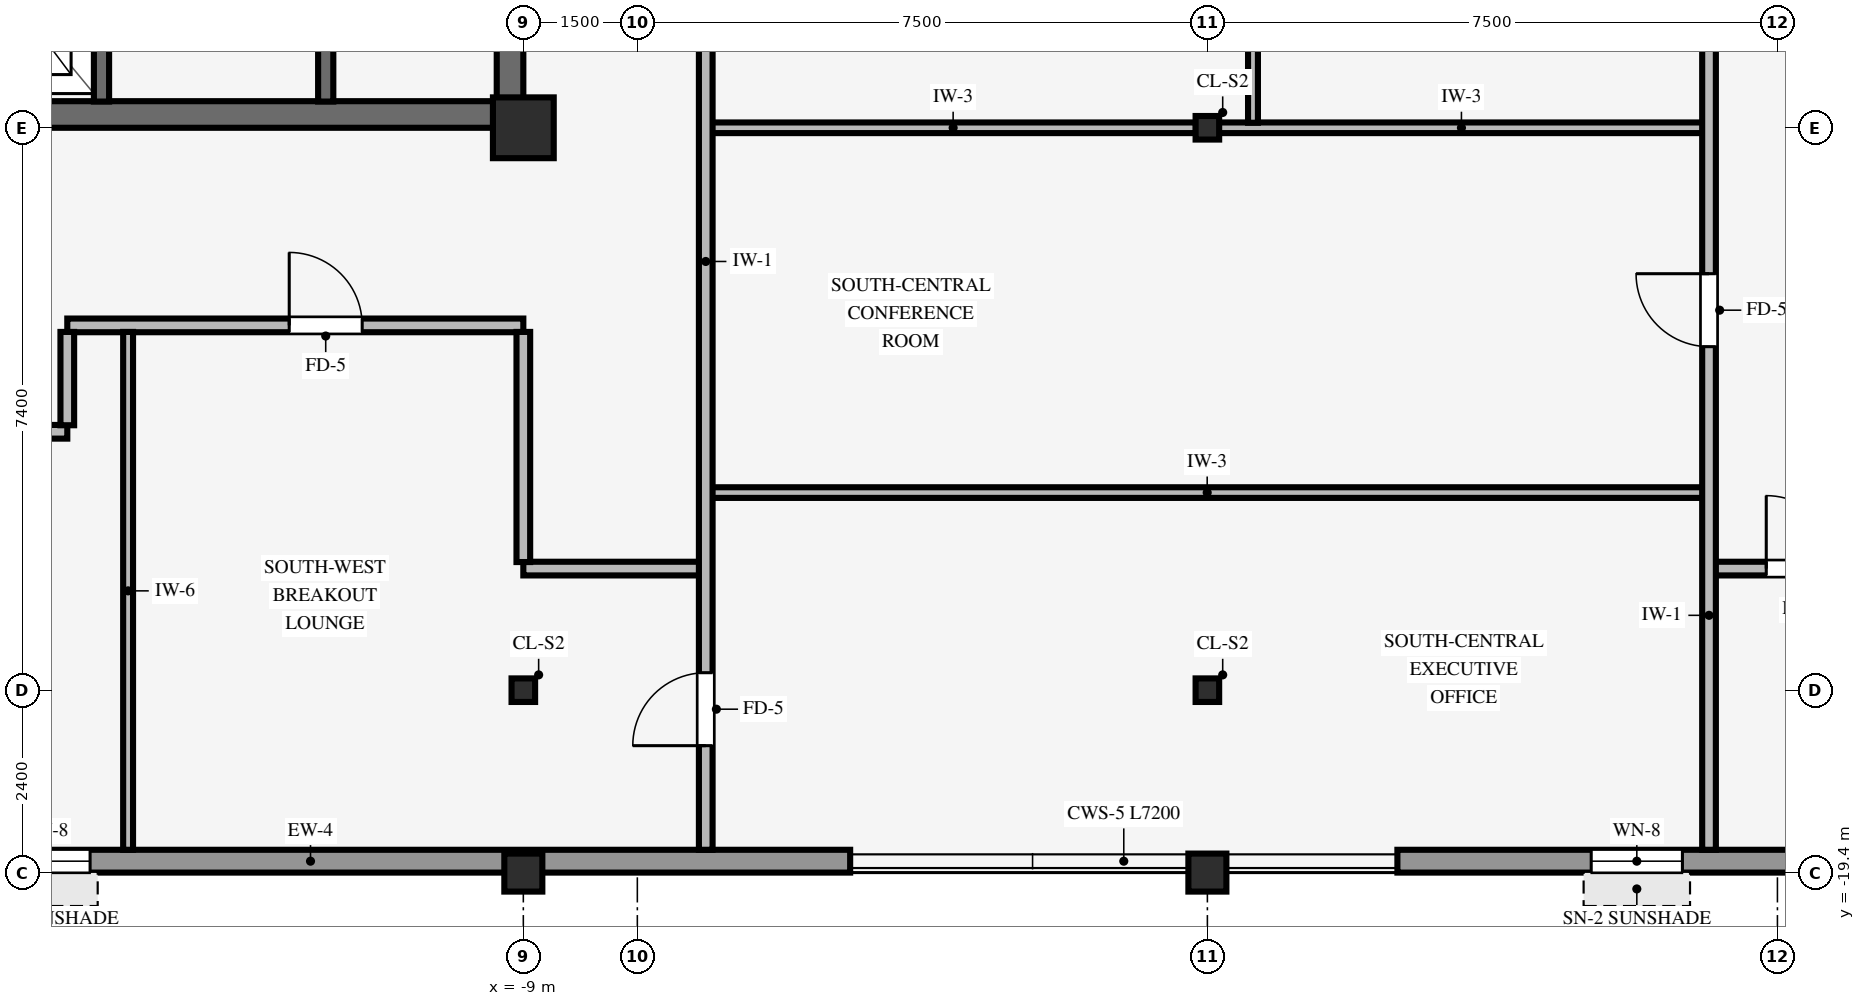
"""IFC4 building model, lengths in metres.
Left out: names, types, materials, properties, quantities, classifications, styles, units other than length and angle.
Written with IfcOpenShell. Run it as: python <this file> out.ifc"""

import sys

from ifc_helpers import new_model, si_unit, direction, frame, frame_2d, origin, origin_2d, place, context, subcontext, project, spatial, rectangle, hollow_rectangle, i_section, extrude, source, transform, mapped, element, fill, save


model = new_model("IFC4")
c1 = context("Model", 3, precision=1e-05, world=origin(), true_north=direction((0.0, 1.0)))
c2 = subcontext(c1, "Body", "Model", "MODEL_VIEW")
j1 = project(units=[si_unit("LENGTHUNIT", "METRE"), si_unit("PLANEANGLEUNIT", "RADIAN")], contexts=[c1])
p1 = place(None, origin())
s1 = spatial("IfcSite", under=j1, at=p1, CompositionType="ELEMENT")
p2 = place(p1, origin())
s2 = spatial("IfcBuilding", under=s1, at=p2, CompositionType="ELEMENT")
p3 = place(p2, frame((0.0, 0.0, 249.3)))
s3 = spatial("IfcBuildingStorey", under=s2, at=p3, CompositionType="ELEMENT", Elevation=249.3)
p4 = place(p3, frame((-17.5, -9.425, 0.0), z_axis=(0.0, 0.0, 1.0), x_axis=(1.0, 0.0, 0.0)))
e1 = element("IfcWall", 1, at=p4, inside=s3, PredefinedType="SHEAR", context=c2, shape_type="SweptSolid", body=[
    extrude(rectangle(XDim=8.5, YDim=0.35, at=frame_2d((4.25, 0.0))), origin(), (0.0, 0.0, 1.0), 3.25),
])
p5 = place(p3, frame((-9.175, -9.255, 0.0), z_axis=(0.0, 0.0, 1.0), x_axis=(0.0, 1.0, 0.0)))
e2 = element("IfcWall", 2, at=p5, inside=s3, PredefinedType="SHEAR", context=c2, shape_type="SweptSolid", body=[
    extrude(rectangle(XDim=18.51, YDim=0.35, at=frame_2d((9.255, 0.0))), origin(), (0.0, 0.0, 1.0), 3.25),
])
p6 = place(p5, frame((8.655, 0.0, 0.0)))
e3 = element("IfcOpeningElement", 3, at=p6, cuts=e2, PredefinedType="OPENING", context=c2, shape_type="SweptSolid", body=[
    extrude(rectangle(XDim=1.2, YDim=2.15, at=frame_2d((0.6, 1.075))), frame((0.0, 0.185, 0.0), z_axis=(0.0, -1.0, 0.0), x_axis=(1.0, 0.0, 0.0)), (0.0, 0.0, 1.0), 0.37),
])
p7 = place(p3, frame((-9.0, -9.6, 0.0), z_axis=(0.0, 0.0, 1.0), x_axis=(1.0, 0.0, 0.0)))
e4 = element("IfcColumn", 4, at=p7, inside=s3, PredefinedType="COLUMN", context=c2, shape_type="SweptSolid", body=[
    extrude(rectangle(XDim=0.8, YDim=0.8, at=origin_2d()), origin(), (0.0, 0.0, 1.0), 3.25),
])
for number, where, z_axis, x_axis in (
    (5, (-9.0, -19.4, 0.0), (0.0, 0.0, 1.0), (1.0, 0.0, 0.0)),
    (6, (0.0, -19.4, 0.0), (0.0, 0.0, 1.0), (1.0, 0.0, 0.0)),
):
    element("IfcColumn", number, at=place(p3, frame(where, z_axis=z_axis, x_axis=x_axis)), inside=s3, PredefinedType="COLUMN", context=c2, shape_type="SweptSolid", body=[
        extrude(hollow_rectangle(XDim=0.5, YDim=0.5, WallThickness=0.032, InnerFilletRadius=0.032, OuterFilletRadius=0.064, at=origin_2d()), origin(), (0.0, 0.0, 1.0), 3.25),
    ])
for number, where, z_axis, x_axis in (
    (7, (0.0, -17.0, 0.0), (0.0, 0.0, 1.0), (1.0, 0.0, 0.0)),
    (8, (0.0, -9.6, 0.0), (0.0, 0.0, 1.0), (1.0, 0.0, 0.0)),
    (9, (-9.0, -17.0, 0.0), (0.0, 0.0, 1.0), (1.0, 0.0, 0.0)),
):
    element("IfcColumn", number, at=place(p3, frame(where, z_axis=z_axis, x_axis=x_axis)), inside=s3, PredefinedType="COLUMN", context=c2, shape_type="SweptSolid", body=[
        extrude(i_section(OverallWidth=0.31, OverallDepth=0.31, WebThickness=0.015, FlangeThickness=0.015, FilletRadius=0.015, at=origin_2d()), origin(), (0.0, 0.0, 1.0), 3.25),
    ])
p8 = place(p3, frame((-18.9, -19.25, 0.0), z_axis=(0.0, 0.0, 1.0), x_axis=(1.0, 0.0, 0.0)))
e10 = element("IfcWall", 10, at=p8, inside=s3, PredefinedType="STANDARD", context=c2, shape_type="SweptSolid", body=[
    extrude(rectangle(XDim=14.2, YDim=0.3, at=frame_2d((7.1, 0.0))), origin(), (0.0, 0.0, 1.0), 2.585),
])
p9 = place(p8, frame((3.0, 0.0, 0.8)))
e11 = element("IfcOpeningElement", 11, at=p9, cuts=e10, PredefinedType="OPENING", context=c2, shape_type="SweptSolid", body=[
    extrude(rectangle(XDim=1.2, YDim=1.48, at=frame_2d((0.6, 0.74))), frame((0.0, 0.16, 0.0), z_axis=(0.0, -1.0, 0.0), x_axis=(1.0, 0.0, 0.0)), (0.0, 0.0, 1.0), 0.32),
])
p10 = place(p3, frame((2.5, -19.25, 0.0), z_axis=(0.0, 0.0, 1.0), x_axis=(1.0, 0.0, 0.0)))
e12 = element("IfcWall", 12, at=p10, inside=s3, PredefinedType="STANDARD", context=c2, shape_type="SweptSolid", body=[
    extrude(rectangle(XDim=14.2, YDim=0.3, at=frame_2d((7.1, 0.0))), origin(), (0.0, 0.0, 1.0), 2.585),
])
p11 = place(p10, frame((2.55, 0.0, 0.8)))
e13 = element("IfcOpeningElement", 13, at=p11, cuts=e12, PredefinedType="OPENING", context=c2, shape_type="SweptSolid", body=[
    extrude(rectangle(XDim=1.2, YDim=1.48, at=frame_2d((0.6, 0.74))), frame((0.0, 0.16, 0.0), z_axis=(0.0, -1.0, 0.0), x_axis=(1.0, 0.0, 0.0)), (0.0, 0.0, 1.0), 0.32),
])
p12 = place(p10, frame((9.55, 0.0, 0.8)))
e14 = element("IfcOpeningElement", 14, at=p12, cuts=e12, PredefinedType="OPENING", context=c2, shape_type="SweptSolid", body=[
    extrude(rectangle(XDim=1.2, YDim=1.48, at=frame_2d((0.6, 0.74))), frame((0.0, 0.16, 0.0), z_axis=(0.0, -1.0, 0.0), x_axis=(1.0, 0.0, 0.0)), (0.0, 0.0, 1.0), 0.32),
])
p13 = place(p3, frame((-14.55, -9.255, 0.0), z_axis=(0.0, 0.0, 1.0), x_axis=(0.0, 1.0, 0.0)))
e15 = element("IfcWall", 15, at=p13, inside=s3, PredefinedType="SHEAR", context=c2, shape_type="SweptSolid", body=[
    extrude(rectangle(XDim=3.06, YDim=0.2, at=frame_2d((1.53, 0.0))), origin(), (0.0, 0.0, 1.0), 3.25),
])
p14 = place(p13, frame((0.98, 0.0, 0.0)))
e16 = element("IfcOpeningElement", 16, at=p14, cuts=e15, PredefinedType="OPENING", context=c2, shape_type="SweptSolid", body=[
    extrude(rectangle(XDim=1.15, YDim=2.15, at=frame_2d((0.575, 1.075))), frame((0.0, 0.11, 0.0), z_axis=(0.0, -1.0, 0.0), x_axis=(1.0, 0.0, 0.0)), (0.0, 0.0, 1.0), 0.22),
])
p15 = place(p3, frame((-11.6, -9.255, 0.0), z_axis=(0.0, 0.0, 1.0), x_axis=(0.0, 1.0, 0.0)))
e17 = element("IfcWall", 17, at=p15, inside=s3, PredefinedType="SHEAR", context=c2, shape_type="SweptSolid", body=[
    extrude(rectangle(XDim=8.025, YDim=0.2, at=frame_2d((4.012, 0.0))), origin(), (0.0, 0.0, 1.0), 3.25),
])
p16 = place(p15, frame((5.615, 0.0, 0.0)))
e18 = element("IfcOpeningElement", 18, at=p16, cuts=e17, PredefinedType="OPENING", context=c2, shape_type="SweptSolid", body=[
    extrude(rectangle(XDim=0.88, YDim=2.1, at=frame_2d((0.44, 1.05))), frame((0.0, 0.11, 0.0), z_axis=(0.0, -1.0, 0.0), x_axis=(1.0, 0.0, 0.0)), (0.0, 0.0, 1.0), 0.22),
])
p17 = place(p3, frame((-9.0, -15.4, 0.0), z_axis=(0.0, 0.0, 1.0), x_axis=(1.0, 0.0, 0.0)))
e19 = element("IfcWall", 19, at=p17, inside=s3, PredefinedType="PARTITIONING", context=c2, shape_type="SweptSolid", body=[
    extrude(rectangle(XDim=2.339, YDim=0.18, at=frame_2d((1.169, 0.0))), origin(), (0.0, 0.0, 1.0), 3.24),
])
p18 = place(p3, frame((6.666, -15.4, 0.0), z_axis=(0.0, 0.0, 1.0), x_axis=(1.0, 0.0, 0.0)))
e20 = element("IfcWall", 20, at=p18, inside=s3, PredefinedType="PARTITIONING", context=c2, shape_type="SweptSolid", body=[
    extrude(rectangle(XDim=11.834, YDim=0.18, at=frame_2d((5.917, 0.0))), origin(), (0.0, 0.0, 1.0), 3.24),
])
p19 = place(p18, frame((0.687, 0.0, 0.0)))
e21 = element("IfcOpeningElement", 21, at=p19, cuts=e20, PredefinedType="OPENING", context=c2, shape_type="SweptSolid", body=[
    extrude(rectangle(XDim=0.96, YDim=2.1, at=frame_2d((0.48, 1.05))), frame((0.0, 0.1, 0.0), z_axis=(0.0, -1.0, 0.0), x_axis=(1.0, 0.0, 0.0)), (0.0, 0.0, 1.0), 0.2),
])
p20 = place(p3, frame((-6.539, -14.4, 0.0), z_axis=(0.0, 0.0, 1.0), x_axis=(1.0, 0.0, 0.0)))
e22 = element("IfcWall", 22, at=p20, inside=s3, PredefinedType="PARTITIONING", context=c2, shape_type="SweptSolid", body=[
    extrude(rectangle(XDim=13.073, YDim=0.14, at=frame_2d((6.537, 0.0))), origin(), (0.0, 0.0, 1.0), 3.24),
])
p21 = place(p3, frame((-20.0, -13.6, 0.0), z_axis=(0.0, 0.0, 1.0), x_axis=(1.0, 0.0, 0.0)))
e23 = element("IfcWall", 23, at=p21, inside=s3, PredefinedType="PARTITIONING", context=c2, shape_type="SweptSolid", body=[
    extrude(rectangle(XDim=5.0, YDim=0.18, at=frame_2d((2.5, 0.0))), origin(), (0.0, 0.0, 1.0), 2.929),
])
p22 = place(p21, frame((2.02, 0.0, 0.0)))
e24 = element("IfcOpeningElement", 24, at=p22, cuts=e23, PredefinedType="OPENING", context=c2, shape_type="SweptSolid", body=[
    extrude(rectangle(XDim=0.96, YDim=2.1, at=frame_2d((0.48, 1.05))), frame((0.0, 0.1, 0.0), z_axis=(0.0, -1.0, 0.0), x_axis=(1.0, 0.0, 0.0)), (0.0, 0.0, 1.0), 0.2),
])
p23 = place(p3, frame((-15.0, -12.2, 0.0), z_axis=(0.0, 0.0, 1.0), x_axis=(1.0, 0.0, 0.0)))
e25 = element("IfcWall", 25, at=p23, inside=s3, PredefinedType="PARTITIONING", context=c2, shape_type="SweptSolid", body=[
    extrude(rectangle(XDim=6.0, YDim=0.18, at=frame_2d((3.0, 0.0))), origin(), (0.0, 0.0, 1.0), 3.24),
])
p24 = place(p23, frame((2.92, 0.0, 0.0)))
e26 = element("IfcOpeningElement", 26, at=p24, cuts=e25, PredefinedType="OPENING", context=c2, shape_type="SweptSolid", body=[
    extrude(rectangle(XDim=0.96, YDim=2.1, at=frame_2d((0.48, 1.05))), frame((0.0, 0.1, 0.0), z_axis=(0.0, -1.0, 0.0), x_axis=(1.0, 0.0, 0.0)), (0.0, 0.0, 1.0), 0.2),
])
p25 = place(p3, frame((-6.539, -9.6, 0.0), z_axis=(0.0, 0.0, 1.0), x_axis=(1.0, 0.0, 0.0)))
e27 = element("IfcWall", 27, at=p25, inside=s3, PredefinedType="PARTITIONING", context=c2, shape_type="SweptSolid", body=[
    extrude(rectangle(XDim=6.388, YDim=0.14, at=frame_2d((3.194, 0.0))), origin(), (0.0, 0.0, 1.0), 2.285),
])
p26 = place(p3, frame((0.151, -9.6, 0.0), z_axis=(0.0, 0.0, 1.0), x_axis=(1.0, 0.0, 0.0)))
e28 = element("IfcWall", 28, at=p26, inside=s3, PredefinedType="PARTITIONING", context=c2, shape_type="SweptSolid", body=[
    extrude(rectangle(XDim=6.383, YDim=0.14, at=frame_2d((3.191, 0.0))), origin(), (0.0, 0.0, 1.0), 2.285),
])
p27 = place(p3, frame((-15.0, -13.514, 0.0), z_axis=(0.0, 0.0, 1.0), x_axis=(0.0, 1.0, 0.0)))
e29 = element("IfcWall", 29, at=p27, inside=s3, PredefinedType="PARTITIONING", context=c2, shape_type="SweptSolid", body=[
    extrude(rectangle(XDim=1.228, YDim=0.18, at=frame_2d((0.614, 0.0))), origin(), (0.0, 0.0, 1.0), 3.24),
])
p28 = place(p3, frame((-14.2, -19.1, 0.0), z_axis=(0.0, 0.0, 1.0), x_axis=(0.0, 1.0, 0.0)))
e30 = element("IfcWall", 30, at=p28, inside=s3, PredefinedType="PARTITIONING", context=c2, shape_type="SweptSolid", body=[
    extrude(rectangle(XDim=6.814, YDim=0.13, at=frame_2d((3.407, 0.0))), origin(), (0.0, 0.0, 1.0), 3.24),
])
p29 = place(p3, frame((-9.0, -15.314, 0.0), z_axis=(0.0, 0.0, 1.0), x_axis=(0.0, 1.0, 0.0)))
e31 = element("IfcWall", 31, at=p29, inside=s3, PredefinedType="PARTITIONING", context=c2, shape_type="SweptSolid", body=[
    extrude(rectangle(XDim=3.028, YDim=0.18, at=frame_2d((1.514, 0.0))), origin(), (0.0, 0.0, 1.0), 2.335),
])
p30 = place(p3, frame((-6.6, -19.1, 0.0), z_axis=(0.0, 0.0, 1.0), x_axis=(0.0, 1.0, 0.0)))
e32 = element("IfcWall", 32, at=p30, inside=s3, PredefinedType="PARTITIONING", context=c2, shape_type="SweptSolid", body=[
    extrude(rectangle(XDim=17.764, YDim=0.18, at=frame_2d((8.882, 0.0))), origin(), (0.0, 0.0, 1.0), 3.24),
])
p31 = place(p30, frame((13.152, 0.0, 0.0)))
e33 = element("IfcOpeningElement", 33, at=p31, cuts=e32, PredefinedType="OPENING", context=c2, shape_type="SweptSolid", body=[
    extrude(rectangle(XDim=0.96, YDim=2.1, at=frame_2d((0.48, 1.05))), frame((0.0, 0.1, 0.0), z_axis=(0.0, -1.0, 0.0), x_axis=(1.0, 0.0, 0.0)), (0.0, 0.0, 1.0), 0.2),
])
p32 = place(p30, frame((1.37, 0.0, 0.0)))
e34 = element("IfcOpeningElement", 34, at=p32, cuts=e32, PredefinedType="OPENING", context=c2, shape_type="SweptSolid", body=[
    extrude(rectangle(XDim=0.96, YDim=2.1, at=frame_2d((0.48, 1.05))), frame((0.0, 0.1, 0.0), z_axis=(0.0, -1.0, 0.0), x_axis=(1.0, 0.0, 0.0)), (0.0, 0.0, 1.0), 0.2),
])
p33 = place(p3, frame((0.6, -9.534, 0.0), z_axis=(0.0, 0.0, 1.0), x_axis=(0.0, 1.0, 0.0)))
e35 = element("IfcWall", 35, at=p33, inside=s3, PredefinedType="PARTITIONING", context=c2, shape_type="SweptSolid", body=[
    extrude(rectangle(XDim=8.198, YDim=0.13, at=frame_2d((4.099, 0.0))), origin(), (0.0, 0.0, 1.0), 3.24),
])
p34 = place(p3, frame((6.6, -19.1, 0.0), z_axis=(0.0, 0.0, 1.0), x_axis=(0.0, 1.0, 0.0)))
e36 = element("IfcWall", 36, at=p34, inside=s3, PredefinedType="PARTITIONING", context=c2, shape_type="SweptSolid", body=[
    extrude(rectangle(XDim=17.764, YDim=0.18, at=frame_2d((8.882, 0.0))), origin(), (0.0, 0.0, 1.0), 3.24),
])
p35 = place(p34, frame((13.152, 0.0, 0.0)))
e37 = element("IfcOpeningElement", 37, at=p35, cuts=e36, PredefinedType="OPENING", context=c2, shape_type="SweptSolid", body=[
    extrude(rectangle(XDim=0.96, YDim=2.1, at=frame_2d((0.48, 1.05))), frame((0.0, 0.1, 0.0), z_axis=(0.0, -1.0, 0.0), x_axis=(1.0, 0.0, 0.0)), (0.0, 0.0, 1.0), 0.2),
])
p36 = place(p34, frame((6.62, 0.0, 0.0)))
e38 = element("IfcOpeningElement", 38, at=p36, cuts=e36, PredefinedType="OPENING", context=c2, shape_type="SweptSolid", body=[
    extrude(rectangle(XDim=0.96, YDim=2.1, at=frame_2d((0.48, 1.05))), frame((0.0, 0.1, 0.0), z_axis=(0.0, -1.0, 0.0), x_axis=(1.0, 0.0, 0.0)), (0.0, 0.0, 1.0), 0.2),
])
m1 = source(origin(), c2, "Body", "SweptSolid", [
    extrude(rectangle(XDim=1.2, YDim=1.48, at=frame_2d((0.6, 0.74))), frame((0.0, 0.03, 0.0), z_axis=(0.0, -1.0, 0.0), x_axis=(1.0, 0.0, 0.0)), (0.0, 0.0, 1.0), 0.06),
])
p37 = place(p9, origin())
e39 = element("IfcWindow", 39, at=p37, inside=s3, PartitioningType="SINGLE_PANEL", PredefinedType="WINDOW", context=c2, shape_type="MappedRepresentation", body=[
    mapped(m1, transform((0.0, 0.0, 0.0), scale=1.0)),
])
fill(e11, e39)
p38 = place(p11, origin())
e40 = element("IfcWindow", 40, at=p38, inside=s3, PartitioningType="SINGLE_PANEL", PredefinedType="WINDOW", context=c2, shape_type="MappedRepresentation", body=[
    mapped(m1, transform((0.0, 0.0, 0.0), scale=1.0)),
])
fill(e13, e40)
m2 = source(origin(), c2, "Body", "SweptSolid", [
    extrude(rectangle(XDim=0.96, YDim=2.1, at=frame_2d((0.48, 1.05))), frame((0.0, 0.025, 0.0), z_axis=(0.0, -1.0, 0.0), x_axis=(1.0, 0.0, 0.0)), (0.0, 0.0, 1.0), 0.05),
])
p39 = place(p24, origin())
e41 = element("IfcDoor", 41, at=p39, inside=s3, OperationType="SINGLE_SWING_LEFT", PredefinedType="DOOR", context=c2, shape_type="MappedRepresentation", body=[
    mapped(m2, transform((0.0, 0.0, 0.0), scale=1.0)),
])
fill(e26, e41)
p40 = place(p36, origin())
e42 = element("IfcDoor", 42, at=p40, inside=s3, OperationType="SINGLE_SWING_RIGHT", PredefinedType="DOOR", context=c2, shape_type="MappedRepresentation", body=[
    mapped(m2, transform((0.0, 0.0, 0.0), scale=1.0)),
])
fill(e38, e42)
p41 = place(p19, origin())
e43 = element("IfcDoor", 43, at=p41, inside=s3, OperationType="SINGLE_SWING_LEFT", PredefinedType="DOOR", context=c2, shape_type="MappedRepresentation", body=[
    mapped(m2, transform((0.0, 0.0, 0.0), scale=1.0)),
])
fill(e21, e43)
p42 = place(p32, origin())
e44 = element("IfcDoor", 44, at=p42, inside=s3, OperationType="SINGLE_SWING_LEFT", PredefinedType="DOOR", context=c2, shape_type="MappedRepresentation", body=[
    mapped(m2, transform((0.0, 0.0, 0.0), scale=1.0)),
])
fill(e34, e44)
save(model, sys.argv[1])
